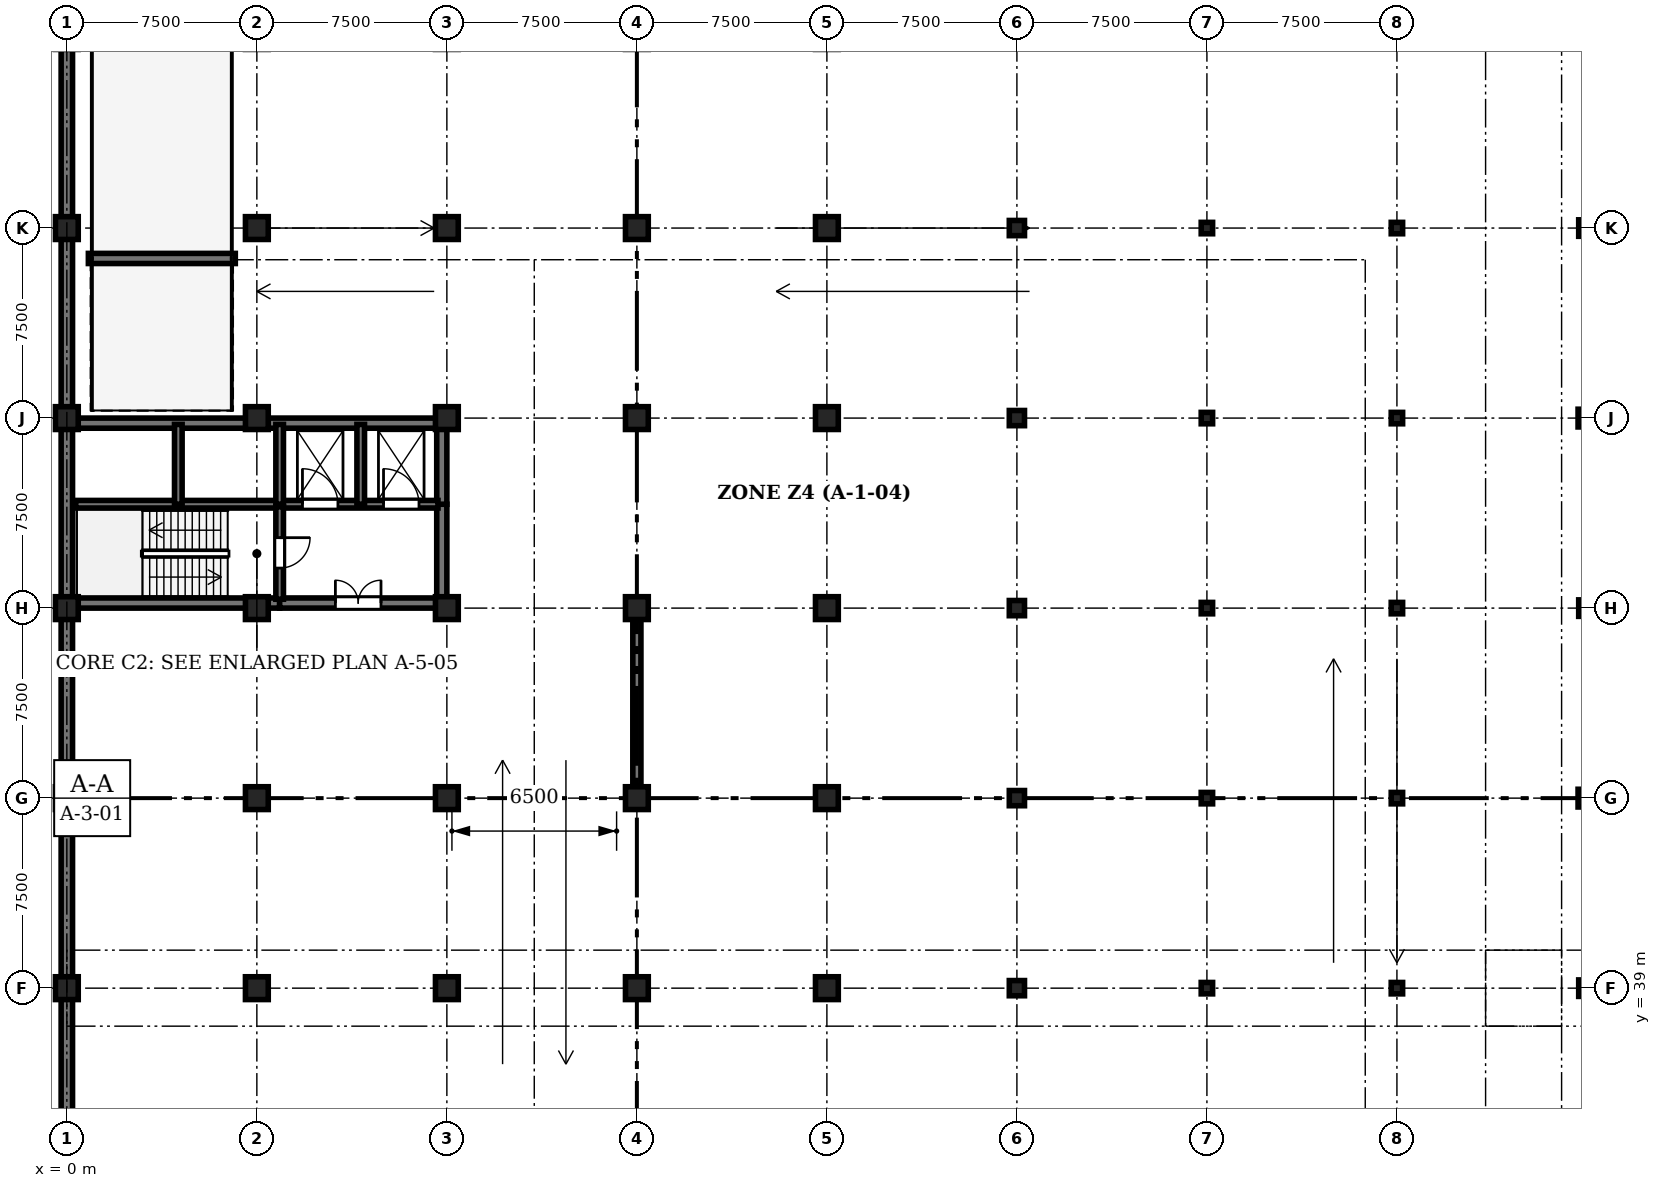
"""IFC4 building model, lengths in metres.
Left out: names, types, materials, properties, quantities, classifications, styles, units other than length and angle.
Written with IfcOpenShell. Run it as: python <this file> out.ifc"""

import sys

from ifc_helpers import new_model, si_unit, direction, frame, frame_2d, origin, origin_2d, place, context, subcontext, project, spatial, rectangle, circle, extrude, element, fill, save


model = new_model("IFC4")
c1 = context("Model", 3, precision=1e-05, world=origin(), true_north=direction((0.0, 1.0)))
c2 = subcontext(c1, "Body", "Model", "MODEL_VIEW")
j1 = project(units=[si_unit("LENGTHUNIT", "METRE"), si_unit("PLANEANGLEUNIT", "RADIAN")], contexts=[c1])
p1 = place(None, origin())
s1 = spatial("IfcSite", under=j1, at=p1, CompositionType="ELEMENT")
p2 = place(p1, origin())
s2 = spatial("IfcBuilding", under=s1, at=p2, CompositionType="ELEMENT")
p3 = place(p2, frame((0.0, 0.0, -4.5)))
s3 = spatial("IfcBuildingStorey", under=s2, at=p3, CompositionType="ELEMENT", Elevation=-4.5)
p4 = place(p3, frame((0.0, 39.0, 0.0), z_axis=(0.0, 0.0, 1.0), x_axis=(1.0, 0.0, 0.0)))
e1 = element("IfcColumn", 1, at=p4, inside=s3, PredefinedType="COLUMN", context=c2, shape_type="SweptSolid", body=[
    extrude(rectangle(XDim=0.9, YDim=0.9, at=origin_2d()), origin(), (0.0, 0.0, 1.0), 4.5),
])
p5 = place(p3, frame((0.0, 46.5, 0.0), z_axis=(0.0, 0.0, 1.0), x_axis=(1.0, 0.0, 0.0)))
e2 = element("IfcColumn", 2, at=p5, inside=s3, PredefinedType="COLUMN", context=c2, shape_type="SweptSolid", body=[
    extrude(circle(Radius=0.45, at=origin_2d()), origin(), (0.0, 0.0, 1.0), 4.5),
])
for number, where, z_axis, x_axis in (
    (3, (0.0, 54.0, 0.0), (0.0, 0.0, 1.0), (1.0, 0.0, 0.0)),
    (4, (0.0, 61.5, 0.0), (0.0, 0.0, 1.0), (1.0, 0.0, 0.0)),
):
    element("IfcColumn", number, at=place(p3, frame(where, z_axis=z_axis, x_axis=x_axis)), inside=s3, PredefinedType="COLUMN", context=c2, shape_type="SweptSolid", body=[
        extrude(rectangle(XDim=0.9, YDim=0.9, at=origin_2d()), origin(), (0.0, 0.0, 1.0), 4.5),
    ])
for number, where, z_axis, x_axis in (
    (5, (0.0, 69.0, 0.0), (0.0, 0.0, 1.0), (1.0, 0.0, 0.0)),
    (6, (7.5, 39.0, 0.0), (0.0, 0.0, 1.0), (1.0, 0.0, 0.0)),
):
    element("IfcColumn", number, at=place(p3, frame(where, z_axis=z_axis, x_axis=x_axis)), inside=s3, PredefinedType="COLUMN", context=c2, shape_type="SweptSolid", body=[
        extrude(circle(Radius=0.45, at=origin_2d()), origin(), (0.0, 0.0, 1.0), 4.5),
    ])
for number, where, z_axis, x_axis in (
    (7, (7.5, 46.5, 0.0), (0.0, 0.0, 1.0), (1.0, 0.0, 0.0)),
    (8, (7.5, 54.0, 0.0), (0.0, 0.0, 1.0), (1.0, 0.0, 0.0)),
):
    element("IfcColumn", number, at=place(p3, frame(where, z_axis=z_axis, x_axis=x_axis)), inside=s3, PredefinedType="COLUMN", context=c2, shape_type="SweptSolid", body=[
        extrude(rectangle(XDim=0.9, YDim=0.9, at=origin_2d()), origin(), (0.0, 0.0, 1.0), 4.5),
    ])
p6 = place(p3, frame((7.5, 61.5, 0.0), z_axis=(0.0, 0.0, 1.0), x_axis=(1.0, 0.0, 0.0)))
e9 = element("IfcColumn", 9, at=p6, inside=s3, PredefinedType="COLUMN", context=c2, shape_type="SweptSolid", body=[
    extrude(circle(Radius=0.45, at=origin_2d()), origin(), (0.0, 0.0, 1.0), 4.5),
])
for number, where, z_axis, x_axis in (
    (10, (7.5, 69.0, 0.0), (0.0, 0.0, 1.0), (1.0, 0.0, 0.0)),
    (11, (15.0, 39.0, 0.0), (0.0, 0.0, 1.0), (1.0, 0.0, 0.0)),
    (12, (15.0, 46.5, 0.0), (0.0, 0.0, 1.0), (1.0, 0.0, 0.0)),
):
    element("IfcColumn", number, at=place(p3, frame(where, z_axis=z_axis, x_axis=x_axis)), inside=s3, PredefinedType="COLUMN", context=c2, shape_type="SweptSolid", body=[
        extrude(rectangle(XDim=0.9, YDim=0.9, at=origin_2d()), origin(), (0.0, 0.0, 1.0), 4.5),
    ])
p7 = place(p3, frame((15.0, 54.0, 0.0), z_axis=(0.0, 0.0, 1.0), x_axis=(1.0, 0.0, 0.0)))
e13 = element("IfcColumn", 13, at=p7, inside=s3, PredefinedType="COLUMN", context=c2, shape_type="SweptSolid", body=[
    extrude(circle(Radius=0.45, at=origin_2d()), origin(), (0.0, 0.0, 1.0), 4.5),
])
for number, where, z_axis, x_axis in (
    (14, (15.0, 61.5, 0.0), (0.0, 0.0, 1.0), (1.0, 0.0, 0.0)),
    (15, (15.0, 69.0, 0.0), (0.0, 0.0, 1.0), (1.0, 0.0, 0.0)),
    (16, (22.5, 39.0, 0.0), (0.0, 0.0, 1.0), (1.0, 0.0, 0.0)),
):
    element("IfcColumn", number, at=place(p3, frame(where, z_axis=z_axis, x_axis=x_axis)), inside=s3, PredefinedType="COLUMN", context=c2, shape_type="SweptSolid", body=[
        extrude(rectangle(XDim=0.9, YDim=0.9, at=origin_2d()), origin(), (0.0, 0.0, 1.0), 4.5),
    ])
p8 = place(p3, frame((22.5, 46.5, 0.0), z_axis=(0.0, 0.0, 1.0), x_axis=(1.0, 0.0, 0.0)))
e17 = element("IfcColumn", 17, at=p8, inside=s3, PredefinedType="COLUMN", context=c2, shape_type="SweptSolid", body=[
    extrude(circle(Radius=0.45, at=origin_2d()), origin(), (0.0, 0.0, 1.0), 4.5),
])
for number, where, z_axis, x_axis in (
    (18, (22.5, 54.0, 0.0), (0.0, 0.0, 1.0), (1.0, 0.0, 0.0)),
    (19, (22.5, 61.5, 0.0), (0.0, 0.0, 1.0), (1.0, 0.0, 0.0)),
):
    element("IfcColumn", number, at=place(p3, frame(where, z_axis=z_axis, x_axis=x_axis)), inside=s3, PredefinedType="COLUMN", context=c2, shape_type="SweptSolid", body=[
        extrude(rectangle(XDim=0.9, YDim=0.9, at=origin_2d()), origin(), (0.0, 0.0, 1.0), 4.5),
    ])
for number, where, z_axis, x_axis in (
    (20, (22.5, 69.0, 0.0), (0.0, 0.0, 1.0), (1.0, 0.0, 0.0)),
    (21, (30.0, 39.0, 0.0), (0.0, 0.0, 1.0), (1.0, 0.0, 0.0)),
):
    element("IfcColumn", number, at=place(p3, frame(where, z_axis=z_axis, x_axis=x_axis)), inside=s3, PredefinedType="COLUMN", context=c2, shape_type="SweptSolid", body=[
        extrude(circle(Radius=0.45, at=origin_2d()), origin(), (0.0, 0.0, 1.0), 4.5),
    ])
for number, where, z_axis, x_axis in (
    (22, (30.0, 46.5, 0.0), (0.0, 0.0, 1.0), (1.0, 0.0, 0.0)),
    (23, (30.0, 54.0, 0.0), (0.0, 0.0, 1.0), (1.0, 0.0, 0.0)),
):
    element("IfcColumn", number, at=place(p3, frame(where, z_axis=z_axis, x_axis=x_axis)), inside=s3, PredefinedType="COLUMN", context=c2, shape_type="SweptSolid", body=[
        extrude(rectangle(XDim=0.9, YDim=0.9, at=origin_2d()), origin(), (0.0, 0.0, 1.0), 4.5),
    ])
p9 = place(p3, frame((30.0, 61.5, 0.0), z_axis=(0.0, 0.0, 1.0), x_axis=(1.0, 0.0, 0.0)))
e24 = element("IfcColumn", 24, at=p9, inside=s3, PredefinedType="COLUMN", context=c2, shape_type="SweptSolid", body=[
    extrude(circle(Radius=0.45, at=origin_2d()), origin(), (0.0, 0.0, 1.0), 4.5),
])
p10 = place(p3, frame((30.0, 69.0, 0.0), z_axis=(0.0, 0.0, 1.0), x_axis=(1.0, 0.0, 0.0)))
e25 = element("IfcColumn", 25, at=p10, inside=s3, PredefinedType="COLUMN", context=c2, shape_type="SweptSolid", body=[
    extrude(rectangle(XDim=0.9, YDim=0.9, at=origin_2d()), origin(), (0.0, 0.0, 1.0), 4.5),
])
for number, where, z_axis, x_axis in (
    (26, (37.5, 39.0, 0.0), (0.0, 0.0, 1.0), (1.0, 0.0, 0.0)),
    (27, (37.5, 46.5, 0.0), (0.0, 0.0, 1.0), (1.0, 0.0, 0.0)),
):
    element("IfcColumn", number, at=place(p3, frame(where, z_axis=z_axis, x_axis=x_axis)), inside=s3, PredefinedType="COLUMN", context=c2, shape_type="SweptSolid", body=[
        extrude(rectangle(XDim=0.6, YDim=0.6, at=origin_2d()), origin(), (0.0, 0.0, 1.0), 4.5),
    ])
p11 = place(p3, frame((37.5, 54.0, 0.0), z_axis=(0.0, 0.0, 1.0), x_axis=(1.0, 0.0, 0.0)))
e28 = element("IfcColumn", 28, at=p11, inside=s3, PredefinedType="COLUMN", context=c2, shape_type="SweptSolid", body=[
    extrude(circle(Radius=0.3, at=origin_2d()), origin(), (0.0, 0.0, 1.0), 4.5),
])
for number, where, z_axis, x_axis in (
    (29, (37.5, 61.5, 0.0), (0.0, 0.0, 1.0), (1.0, 0.0, 0.0)),
    (30, (37.5, 69.0, 0.0), (0.0, 0.0, 1.0), (1.0, 0.0, 0.0)),
):
    element("IfcColumn", number, at=place(p3, frame(where, z_axis=z_axis, x_axis=x_axis)), inside=s3, PredefinedType="COLUMN", context=c2, shape_type="SweptSolid", body=[
        extrude(rectangle(XDim=0.6, YDim=0.6, at=origin_2d()), origin(), (0.0, 0.0, 1.0), 4.5),
    ])
for number, where, z_axis, x_axis in (
    (31, (45.0, 39.0, 0.0), (0.0, 0.0, 1.0), (1.0, 0.0, 0.0)),
    (32, (45.0, 46.5, 0.0), (0.0, 0.0, 1.0), (1.0, 0.0, 0.0)),
    (33, (45.0, 54.0, 0.0), (0.0, 0.0, 1.0), (1.0, 0.0, 0.0)),
    (34, (45.0, 61.5, 0.0), (0.0, 0.0, 1.0), (1.0, 0.0, 0.0)),
    (35, (45.0, 69.0, 0.0), (0.0, 0.0, 1.0), (1.0, 0.0, 0.0)),
    (36, (52.5, 39.0, 0.0), (0.0, 0.0, 1.0), (1.0, 0.0, 0.0)),
    (37, (52.5, 46.5, 0.0), (0.0, 0.0, 1.0), (1.0, 0.0, 0.0)),
    (38, (52.5, 54.0, 0.0), (0.0, 0.0, 1.0), (1.0, 0.0, 0.0)),
    (39, (52.5, 61.5, 0.0), (0.0, 0.0, 1.0), (1.0, 0.0, 0.0)),
    (40, (52.5, 69.0, 0.0), (0.0, 0.0, 1.0), (1.0, 0.0, 0.0)),
):
    element("IfcColumn", number, at=place(p3, frame(where, z_axis=z_axis, x_axis=x_axis)), inside=s3, PredefinedType="COLUMN", context=c2, shape_type="SweptSolid", body=[
        extrude(rectangle(XDim=0.45, YDim=0.45, at=origin_2d()), origin(), (0.0, 0.0, 1.0), 4.5),
    ])
p12 = place(p3, frame((60.0, 39.0, 0.0), z_axis=(0.0, 0.0, 1.0), x_axis=(1.0, 0.0, 0.0)))
e41 = element("IfcColumn", 41, at=p12, inside=s3, PredefinedType="COLUMN", context=c2, shape_type="SweptSolid", body=[
    extrude(rectangle(XDim=0.65, YDim=0.65, at=origin_2d()), origin(), (0.0, 0.0, 1.0), 4.5),
])
p13 = place(p3, frame((60.0, 46.5, 0.0), z_axis=(0.0, 0.0, 1.0), x_axis=(1.0, 0.0, 0.0)))
e42 = element("IfcColumn", 42, at=p13, inside=s3, PredefinedType="COLUMN", context=c2, shape_type="SweptSolid", body=[
    extrude(rectangle(XDim=0.7, YDim=0.7, at=origin_2d()), origin(), (0.0, 0.0, 1.0), 4.5),
])
p14 = place(p3, frame((60.0, 54.0, 0.0), z_axis=(0.0, 0.0, 1.0), x_axis=(1.0, 0.0, 0.0)))
e43 = element("IfcColumn", 43, at=p14, inside=s3, PredefinedType="COLUMN", context=c2, shape_type="SweptSolid", body=[
    extrude(rectangle(XDim=0.65, YDim=0.65, at=origin_2d()), origin(), (0.0, 0.0, 1.0), 4.5),
])
p15 = place(p3, frame((60.0, 61.5, 0.0), z_axis=(0.0, 0.0, 1.0), x_axis=(1.0, 0.0, 0.0)))
e44 = element("IfcColumn", 44, at=p15, inside=s3, PredefinedType="COLUMN", context=c2, shape_type="SweptSolid", body=[
    extrude(rectangle(XDim=0.7, YDim=0.7, at=origin_2d()), origin(), (0.0, 0.0, 1.0), 4.5),
])
p16 = place(p3, frame((60.0, 69.0, 0.0), z_axis=(0.0, 0.0, 1.0), x_axis=(1.0, 0.0, 0.0)))
e45 = element("IfcColumn", 45, at=p16, inside=s3, PredefinedType="COLUMN", context=c2, shape_type="SweptSolid", body=[
    extrude(rectangle(XDim=0.65, YDim=0.65, at=origin_2d()), origin(), (0.0, 0.0, 1.0), 4.5),
])
for number, where, z_axis, x_axis in (
    (46, (0.0, 39.0, 0.0), (0.0, 0.0, 1.0), (0.0, 1.0, 0.0)),
    (47, (0.0, 46.5, 0.0), (0.0, 0.0, 1.0), (0.0, 1.0, 0.0)),
    (48, (0.0, 54.0, 0.0), (0.0, 0.0, 1.0), (0.0, 1.0, 0.0)),
    (49, (0.0, 61.5, 0.0), (0.0, 0.0, 1.0), (0.0, 1.0, 0.0)),
    (50, (0.0, 69.0, 0.0), (0.0, 0.0, 1.0), (0.0, 1.0, 0.0)),
    (51, (0.0, 31.5, 0.0), (0.0, 0.0, 1.0), (0.0, 1.0, 0.0)),
):
    element("IfcWall", number, at=place(p3, frame(where, z_axis=z_axis, x_axis=x_axis)), inside=s3, PredefinedType="SOLIDWALL", context=c2, shape_type="SweptSolid", body=[
        extrude(rectangle(XDim=7.5, YDim=0.45, at=frame_2d((3.75, 0.0))), origin(), (0.0, 0.0, 1.0), 4.14),
    ])
p17 = place(p3, frame((22.5, 46.95, 0.0), z_axis=(0.0, 0.0, 1.0), x_axis=(0.0, 1.0, 0.0)))
e52 = element("IfcWall", 52, at=p17, inside=s3, PredefinedType="SHEAR", context=c2, shape_type="SweptSolid", body=[
    extrude(rectangle(XDim=6.6, YDim=0.32, at=frame_2d((3.3, 0.0))), origin(), (0.0, 0.0, 1.0), 3.59),
])
p18 = place(p3, frame((0.85, 67.8, 0.0), z_axis=(0.0, 0.0, 1.0), x_axis=(1.0, 0.0, 0.0)))
e53 = element("IfcWall", 53, at=p18, inside=s3, PredefinedType="SHEAR", context=c2, shape_type="SweptSolid", body=[
    extrude(rectangle(XDim=5.8, YDim=0.4, at=frame_2d((2.9, 0.0))), origin(), (0.0, 0.0, 1.0), 0.2),
])
p19 = place(p3, frame((0.35, 54.2, 0.0), z_axis=(0.0, 0.0, 1.0), x_axis=(1.0, 0.0, 0.0)))
e54 = element("IfcWall", 54, at=p19, inside=s3, PredefinedType="SHEAR", context=c2, shape_type="SweptSolid", body=[
    extrude(rectangle(XDim=8.05, YDim=0.4, at=frame_2d((4.025, 0.0))), origin(), (0.0, 0.0, 1.0), 4.14),
])
p20 = place(p3, frame((8.4, 54.2, 0.0), z_axis=(0.0, 0.0, 1.0), x_axis=(1.0, 0.0, 0.0)))
e55 = element("IfcWall", 55, at=p20, inside=s3, PredefinedType="SHEAR", context=c2, shape_type="SweptSolid", body=[
    extrude(rectangle(XDim=6.25, YDim=0.4, at=frame_2d((3.125, 0.0))), origin(), (0.0, 0.0, 1.0), 4.14),
])
p21 = place(p20, frame((2.2, 0.0, 0.0)))
e56 = element("IfcOpeningElement", 56, at=p21, cuts=e55, PredefinedType="OPENING", context=c2, shape_type="SweptSolid", body=[
    extrude(rectangle(XDim=1.8, YDim=2.25, at=frame_2d((0.9, 1.125))), frame((0.0, 0.21, 0.0), z_axis=(0.0, -1.0, 0.0), x_axis=(1.0, 0.0, 0.0)), (0.0, 0.0, 1.0), 0.42),
])
p22 = place(p3, frame((0.35, 61.3, 0.0), z_axis=(0.0, 0.0, 1.0), x_axis=(1.0, 0.0, 0.0)))
e57 = element("IfcWall", 57, at=p22, inside=s3, PredefinedType="SHEAR", context=c2, shape_type="SweptSolid", body=[
    extrude(rectangle(XDim=14.3, YDim=0.4, at=frame_2d((7.15, 0.0))), origin(), (0.0, 0.0, 1.0), 4.14),
])
p23 = place(p3, frame((14.8, 54.35, 0.0), z_axis=(0.0, 0.0, 1.0), x_axis=(0.0, 1.0, 0.0)))
e58 = element("IfcWall", 58, at=p23, inside=s3, PredefinedType="SHEAR", context=c2, shape_type="SweptSolid", body=[
    extrude(rectangle(XDim=3.75, YDim=0.4, at=frame_2d((1.875, 0.0))), origin(), (0.0, 0.0, 1.0), 4.14),
])
p24 = place(p3, frame((14.8, 58.1, 0.0), z_axis=(0.0, 0.0, 1.0), x_axis=(0.0, 1.0, 0.0)))
e59 = element("IfcWall", 59, at=p24, inside=s3, PredefinedType="SHEAR", context=c2, shape_type="SweptSolid", body=[
    extrude(rectangle(XDim=3.05, YDim=0.4, at=frame_2d((1.525, 0.0))), origin(), (0.0, 0.0, 1.0), 4.14),
])
p25 = place(p3, frame((0.35, 58.1, 0.0), z_axis=(0.0, 0.0, 1.0), x_axis=(1.0, 0.0, 0.0)))
e60 = element("IfcWall", 60, at=p25, inside=s3, PredefinedType="SHEAR", context=c2, shape_type="SweptSolid", body=[
    extrude(rectangle(XDim=8.05, YDim=0.3, at=frame_2d((4.025, 0.0))), origin(), (0.0, 0.0, 1.0), 4.14),
])
p26 = place(p3, frame((8.4, 58.1, 0.0), z_axis=(0.0, 0.0, 1.0), x_axis=(1.0, 0.0, 0.0)))
e61 = element("IfcWall", 61, at=p26, inside=s3, PredefinedType="SHEAR", context=c2, shape_type="SweptSolid", body=[
    extrude(rectangle(XDim=6.25, YDim=0.3, at=frame_2d((3.125, 0.0))), origin(), (0.0, 0.0, 1.0), 4.14),
])
p27 = place(p26, frame((0.9, 0.0, 0.0)))
e62 = element("IfcOpeningElement", 62, at=p27, cuts=e61, PredefinedType="OPENING", context=c2, shape_type="SweptSolid", body=[
    extrude(rectangle(XDim=1.4, YDim=2.25, at=frame_2d((0.7, 1.125))), frame((0.0, 0.16, 0.0), z_axis=(0.0, -1.0, 0.0), x_axis=(1.0, 0.0, 0.0)), (0.0, 0.0, 1.0), 0.32),
])
p28 = place(p26, frame((4.1, 0.0, 0.0)))
e63 = element("IfcOpeningElement", 63, at=p28, cuts=e61, PredefinedType="OPENING", context=c2, shape_type="SweptSolid", body=[
    extrude(rectangle(XDim=1.4, YDim=2.25, at=frame_2d((0.7, 1.125))), frame((0.0, 0.16, 0.0), z_axis=(0.0, -1.0, 0.0), x_axis=(1.0, 0.0, 0.0)), (0.0, 0.0, 1.0), 0.32),
])
p29 = place(p3, frame((8.4, 58.0, 0.0), z_axis=(0.0, 0.0, 1.0), x_axis=(0.0, -1.0, 0.0)))
e64 = element("IfcWall", 64, at=p29, inside=s3, PredefinedType="SHEAR", context=c2, shape_type="SweptSolid", body=[
    extrude(rectangle(XDim=3.65, YDim=0.3, at=frame_2d((1.825, 0.0))), origin(), (0.0, 0.0, 1.0), 4.14),
])
p30 = place(p29, frame((1.22, 0.0, 0.0)))
e65 = element("IfcOpeningElement", 65, at=p30, cuts=e64, PredefinedType="OPENING", context=c2, shape_type="SweptSolid", body=[
    extrude(rectangle(XDim=1.2, YDim=2.25, at=frame_2d((0.6, 1.125))), frame((0.0, 0.16, 0.0), z_axis=(0.0, -1.0, 0.0), x_axis=(1.0, 0.0, 0.0)), (0.0, 0.0, 1.0), 0.32),
])
for number, where, z_axis, x_axis in (
    (66, (4.4, 58.1, 0.0), (0.0, 0.0, 1.0), (0.0, 1.0, 0.0)),
    (67, (8.4, 58.1, 0.0), (0.0, 0.0, 1.0), (0.0, 1.0, 0.0)),
    (68, (11.6, 58.1, 0.0), (0.0, 0.0, 1.0), (0.0, 1.0, 0.0)),
):
    element("IfcWall", number, at=place(p3, frame(where, z_axis=z_axis, x_axis=x_axis)), inside=s3, PredefinedType="SHEAR", context=c2, shape_type="SweptSolid", body=[
        extrude(rectangle(XDim=3.15, YDim=0.3, at=frame_2d((1.575, 0.0))), origin(), (0.0, 0.0, 1.0), 4.14),
    ])
p31 = place(p21, origin())
e69 = element("IfcDoor", 69, at=p31, inside=s3, OperationType="DOUBLE_DOOR_SINGLE_SWING", PredefinedType="DOOR", context=c2, shape_type="SweptSolid", body=[
    extrude(rectangle(XDim=1.8, YDim=2.25, at=frame_2d((0.9, 1.125))), frame((0.0, 0.025, 0.0), z_axis=(0.0, -1.0, 0.0), x_axis=(1.0, 0.0, 0.0)), (0.0, 0.0, 1.0), 0.05),
])
fill(e56, e69)
p32 = place(p27, origin())
e70 = element("IfcDoor", 70, at=p32, inside=s3, OperationType="DOUBLE_DOOR_SLIDING", PredefinedType="DOOR", context=c2, shape_type="SweptSolid", body=[
    extrude(rectangle(XDim=1.4, YDim=2.25, at=frame_2d((0.7, 1.125))), frame((0.0, 0.025, 0.0), z_axis=(0.0, -1.0, 0.0), x_axis=(1.0, 0.0, 0.0)), (0.0, 0.0, 1.0), 0.05),
])
fill(e62, e70)
p33 = place(p28, origin())
e71 = element("IfcDoor", 71, at=p33, inside=s3, OperationType="DOUBLE_DOOR_SLIDING", PredefinedType="DOOR", context=c2, shape_type="SweptSolid", body=[
    extrude(rectangle(XDim=1.4, YDim=2.25, at=frame_2d((0.7, 1.125))), frame((0.0, 0.025, 0.0), z_axis=(0.0, -1.0, 0.0), x_axis=(1.0, 0.0, 0.0)), (0.0, 0.0, 1.0), 0.05),
])
fill(e63, e71)
p34 = place(p30, origin())
e72 = element("IfcDoor", 72, at=p34, inside=s3, OperationType="SINGLE_SWING_LEFT", PredefinedType="DOOR", context=c2, shape_type="SweptSolid", body=[
    extrude(rectangle(XDim=1.2, YDim=2.25, at=frame_2d((0.6, 1.125))), frame((0.0, 0.025, 0.0), z_axis=(0.0, -1.0, 0.0), x_axis=(1.0, 0.0, 0.0)), (0.0, 0.0, 1.0), 0.05),
])
fill(e65, e72)
save(model, sys.argv[1])
